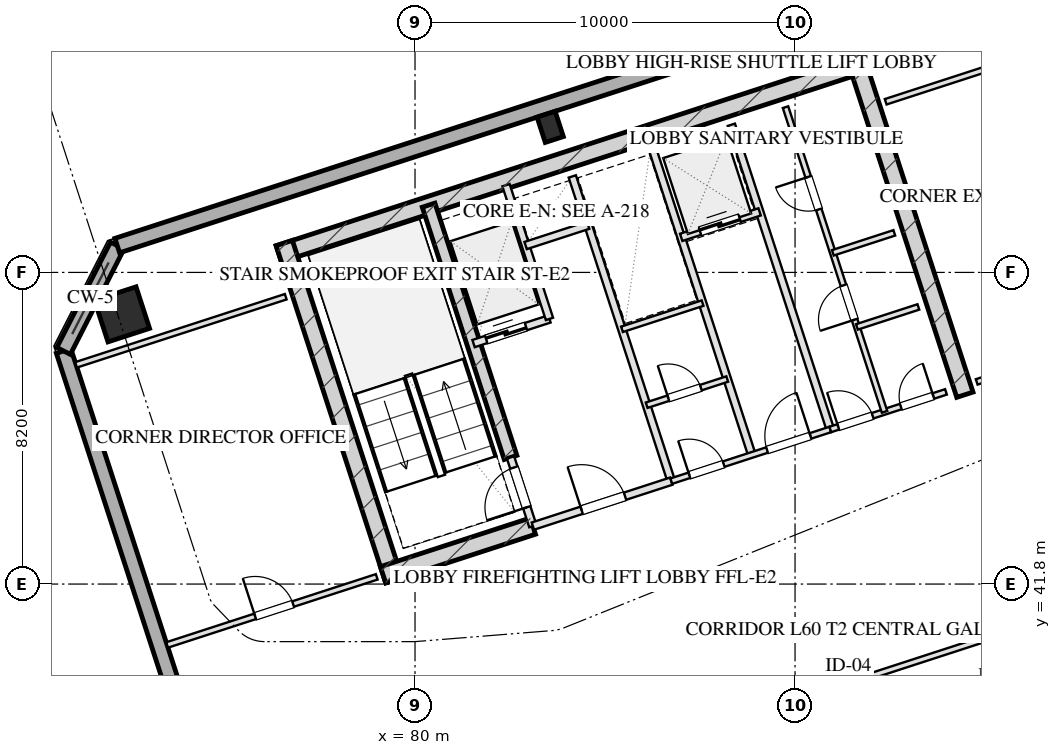
"""IFC4 building model, lengths in metres.
Left out: names, types, materials, properties, quantities, classifications, styles, units other than length and angle.
Written with IfcOpenShell. Run it as: python <this file> out.ifc"""

import sys

from ifc_helpers import new_model, si_unit, direction, frame, frame_2d, origin, origin_2d, place, context, subcontext, project, spatial, rectangle, hollow_rectangle, extrude, element, fill, save


model = new_model("IFC4")
c1 = context("Model", 3, precision=1e-05, world=origin(), true_north=direction((0.0, 1.0)))
c2 = subcontext(c1, "Body", "Model", "MODEL_VIEW")
j1 = project(units=[si_unit("LENGTHUNIT", "METRE"), si_unit("PLANEANGLEUNIT", "RADIAN")], contexts=[c1])
p1 = place(None, origin())
s1 = spatial("IfcSite", under=j1, at=p1, CompositionType="ELEMENT")
p2 = place(p1, origin())
s2 = spatial("IfcBuilding", under=s1, at=p2, CompositionType="ELEMENT")
p3 = place(p2, frame((0.0, 0.0, 223.1)))
s3 = spatial("IfcBuildingStorey", under=s2, at=p3, CompositionType="ELEMENT", Elevation=223.1)
p4 = place(p3, frame((76.415, 50.489, 0.0), z_axis=(0.0, 0.0, 1.0), x_axis=(0.951056810414, 0.309016089169, 0.0)))
e1 = element("IfcWall", 1, at=p4, inside=s3, PredefinedType="SHEAR", context=c2, shape_type="SweptSolid", body=[
    extrude(rectangle(XDim=16.25, YDim=0.45, at=frame_2d((8.125, 0.0))), origin(), (0.0, 0.0, 1.0), 3.45),
])
for number, where, z_axis, x_axis in (
    (2, (79.442, 41.899, 0.0), (0.0, 0.0, 1.0), (-0.309, 0.951, 0.0)),
    (3, (94.469, 46.781, 0.0), (0.0, 0.0, 1.0), (-0.309, 0.951, 0.0)),
):
    element("IfcWall", number, at=place(p3, frame(where, z_axis=z_axis, x_axis=x_axis)), inside=s3, PredefinedType="SHEAR", context=c2, shape_type="SweptSolid", body=[
        extrude(rectangle(XDim=9.33, YDim=0.45, at=frame_2d((4.665, 0.0))), origin(), (0.0, 0.0, 1.0), 3.45),
    ])
p5 = place(p3, frame((82.514, 45.131, 0.0), z_axis=(0.0, 0.0, 1.0), x_axis=(-0.308988790936, 0.951065679686, 0.0)))
e4 = element("IfcWall", 4, at=p5, inside=s3, PredefinedType="SHEAR", context=c2, shape_type="SweptSolid", body=[
    extrude(rectangle(XDim=6.98, YDim=0.35, at=frame_2d((3.49, 0.0))), origin(), (0.0, 0.0, 1.0), 3.45),
])
p6 = place(p3, frame((79.159, 42.043, 0.0), z_axis=(0.0, 0.0, 1.0), x_axis=(0.951047485828, 0.309044785913, 0.0)))
e5 = element("IfcWall", 5, at=p6, inside=s3, PredefinedType="SHEAR", context=c2, shape_type="SweptSolid", body=[
    extrude(rectangle(XDim=4.145, YDim=0.45, at=frame_2d((2.073, 0.0))), origin(), (0.0, 0.0, 1.0), 3.45),
])
for number, where, z_axis, x_axis in (
    (6, (95.572, 56.461, 0.0), (0.0, 0.0, 1.0), (0.951, 0.309, 0.0)),
    (7, (72.29, 48.896, 0.0), (0.0, 0.0, 1.0), (0.951, 0.309, 0.0)),
):
    element("IfcColumn", number, at=place(p3, frame(where, z_axis=z_axis, x_axis=x_axis)), inside=s3, PredefinedType="COLUMN", context=c2, shape_type="SweptSolid", body=[
        extrude(hollow_rectangle(XDim=1.15, YDim=1.15, WallThickness=0.04, at=origin_2d()), origin(), (0.0, 0.0, 1.0), 3.451),
    ])
p7 = place(p3, frame((83.557, 53.83, 0.0), z_axis=(0.0, 0.0, 1.0), x_axis=(0.951056516295, 0.309016994375, 0.0)))
e8 = element("IfcColumn", 8, at=p7, inside=s3, PredefinedType="COLUMN", context=c2, shape_type="SweptSolid", body=[
    extrude(hollow_rectangle(XDim=0.5, YDim=0.7, WallThickness=0.025, at=origin_2d()), origin(), (0.0, 0.0, 1.0), 3.451),
])
p8 = place(p3, frame((82.618, 11.414, 0.0), z_axis=(0.0, 0.0, 1.0), x_axis=(-0.309016491071, 0.951056679828, 0.0)))
e9 = element("IfcWall", 9, at=p8, inside=s3, PredefinedType="SOLIDWALL", context=c2, shape_type="SweptSolid", body=[
    extrude(rectangle(XDim=38.4, YDim=0.4, at=frame_2d((19.2, 0.0))), origin(), (0.0, 0.0, 1.0), 2.61),
])
p9 = place(p8, frame((11.75, 0.0, 0.75)))
e10 = element("IfcOpeningElement", 10, at=p9, cuts=e9, PredefinedType="OPENING", context=c2, shape_type="SweptSolid", body=[
    extrude(rectangle(XDim=2.1, YDim=1.46, at=frame_2d((1.05, 0.73))), frame((0.0, 0.21, 0.0), z_axis=(0.0, -1.0, 0.0), x_axis=(1.0, 0.0, 0.0)), (0.0, 0.0, 1.0), 0.42),
])
p10 = place(p8, frame((15.55, 0.0, 0.75)))
e11 = element("IfcOpeningElement", 11, at=p10, cuts=e9, PredefinedType="OPENING", context=c2, shape_type="SweptSolid", body=[
    extrude(rectangle(XDim=2.1, YDim=1.46, at=frame_2d((1.05, 0.73))), frame((0.0, 0.21, 0.0), z_axis=(0.0, -1.0, 0.0), x_axis=(1.0, 0.0, 0.0)), (0.0, 0.0, 1.0), 0.42),
])
p11 = place(p8, frame((20.75, 0.0, 0.75)))
e12 = element("IfcOpeningElement", 12, at=p11, cuts=e9, PredefinedType="OPENING", context=c2, shape_type="SweptSolid", body=[
    extrude(rectangle(XDim=2.1, YDim=1.46, at=frame_2d((1.05, 0.73))), frame((0.0, 0.21, 0.0), z_axis=(0.0, -1.0, 0.0), x_axis=(1.0, 0.0, 0.0)), (0.0, 0.0, 1.0), 0.42),
])
p12 = place(p8, frame((24.55, 0.0, 0.75)))
e13 = element("IfcOpeningElement", 13, at=p12, cuts=e9, PredefinedType="OPENING", context=c2, shape_type="SweptSolid", body=[
    extrude(rectangle(XDim=2.1, YDim=1.46, at=frame_2d((1.05, 0.73))), frame((0.0, 0.21, 0.0), z_axis=(0.0, -1.0, 0.0), x_axis=(1.0, 0.0, 0.0)), (0.0, 0.0, 1.0), 0.42),
])
p13 = place(p3, frame((70.752, 47.934, 0.0), z_axis=(0.0, 0.0, 1.0), x_axis=(0.453949291228, 0.891027519774, 0.0)))
e14 = element("IfcWall", 14, at=p13, inside=s3, PredefinedType="SOLIDWALL", context=c2, shape_type="SweptSolid", body=[
    extrude(rectangle(XDim=3.111, YDim=0.4, at=frame_2d((1.556, 0.0))), origin(), (0.0, 0.0, 1.0), 2.61),
])
p14 = place(p3, frame((72.165, 50.706, 0.0), z_axis=(0.0, 0.0, 1.0), x_axis=(0.951058012937, 0.309012388148, 0.0)))
e15 = element("IfcWall", 15, at=p14, inside=s3, PredefinedType="SOLIDWALL", context=c2, shape_type="SweptSolid", body=[
    extrude(rectangle(XDim=23.6, YDim=0.4, at=frame_2d((11.8, 0.0))), origin(), (0.0, 0.0, 1.0), 2.61),
])
p15 = place(p3, frame((83.101, 43.324, 0.0), z_axis=(0.0, 0.0, 1.0), x_axis=(-0.309048298632, 0.951046344356, 0.0)))
e16 = element("IfcWall", 16, at=p15, inside=s3, PredefinedType="PARTITIONING", context=c2, shape_type="SweptSolid", body=[
    extrude(rectangle(XDim=1.9, YDim=0.2, at=frame_2d((0.95, 0.0))), origin(), (0.0, 0.0, 1.0), 3.175),
])
p16 = place(p15, frame((0.52, 0.0, 0.0)))
e17 = element("IfcOpeningElement", 17, at=p16, cuts=e16, PredefinedType="OPENING", context=c2, shape_type="SweptSolid", body=[
    extrude(rectangle(XDim=1.1, YDim=2.05, at=frame_2d((0.55, 1.025))), frame((0.0, 0.11, 0.0), z_axis=(0.0, -1.0, 0.0), x_axis=(1.0, 0.0, 0.0)), (0.0, 0.0, 1.0), 0.22),
])
p17 = place(p3, frame((86.743, 44.508, 0.0), z_axis=(0.0, 0.0, 1.0), x_axis=(-0.309016001439, 0.951056838919, 0.0)))
e18 = element("IfcWall", 18, at=p17, inside=s3, PredefinedType="PARTITIONING", context=c2, shape_type="SweptSolid", body=[
    extrude(rectangle(XDim=8.43, YDim=0.2, at=frame_2d((4.215, 0.0))), origin(), (0.0, 0.0, 1.0), 3.175),
])
p18 = place(p3, frame((83.101, 43.324, 0.0), z_axis=(0.0, 0.0, 1.0), x_axis=(0.951052804469, 0.309028417967, 0.0)))
e19 = element("IfcWall", 19, at=p18, inside=s3, PredefinedType="PARTITIONING", context=c2, shape_type="SweptSolid", body=[
    extrude(rectangle(XDim=3.83, YDim=0.2, at=frame_2d((1.915, 0.0))), origin(), (0.0, 0.0, 1.0), 3.175),
])
p19 = place(p18, frame((1.35, 0.0, 0.0)))
e20 = element("IfcOpeningElement", 20, at=p19, cuts=e19, PredefinedType="OPENING", context=c2, shape_type="SweptSolid", body=[
    extrude(rectangle(XDim=1.2, YDim=2.05, at=frame_2d((0.6, 1.025))), frame((0.0, 0.11, 0.0), z_axis=(0.0, -1.0, 0.0), x_axis=(1.0, 0.0, 0.0)), (0.0, 0.0, 1.0), 0.22),
])
p20 = place(p3, frame((81.54, 48.127, 0.0), z_axis=(0.0, 0.0, 1.0), x_axis=(0.951062257173, 0.308999325213, 0.0)))
e21 = element("IfcWall", 21, at=p20, inside=s3, PredefinedType="PARTITIONING", context=c2, shape_type="SweptSolid", body=[
    extrude(rectangle(XDim=2.1, YDim=0.2, at=frame_2d((1.05, 0.0))), origin(), (0.0, 0.0, 1.0), 3.175),
])
p21 = place(p20, frame((0.35, 0.0, 0.0)))
e22 = element("IfcOpeningElement", 22, at=p21, cuts=e21, PredefinedType="OPENING", context=c2, shape_type="SweptSolid", body=[
    extrude(rectangle(XDim=1.1, YDim=2.05, at=frame_2d((0.55, 1.025))), frame((0.0, 0.11, 0.0), z_axis=(0.0, -1.0, 0.0), x_axis=(1.0, 0.0, 0.0)), (0.0, 0.0, 1.0), 0.22),
])
p22 = place(p3, frame((83.538, 48.776, 0.0), z_axis=(0.0, 0.0, 1.0), x_axis=(-0.3089935693, 0.951064127245, 0.0)))
e23 = element("IfcWall", 23, at=p22, inside=s3, PredefinedType="PARTITIONING", context=c2, shape_type="SweptSolid", body=[
    extrude(rectangle(XDim=3.7, YDim=0.2, at=frame_2d((1.85, 0.0))), origin(), (0.0, 0.0, 1.0), 3.175),
])
p23 = place(p3, frame((82.91, 50.707, 0.0), z_axis=(0.0, 0.0, 1.0), x_axis=(0.951041328149, 0.309063734775, 0.0)))
e24 = element("IfcWall", 24, at=p23, inside=s3, PredefinedType="PARTITIONING", context=c2, shape_type="SweptSolid", body=[
    extrude(rectangle(XDim=1.73, YDim=0.2, at=frame_2d((0.865, 0.0))), origin(), (0.0, 0.0, 1.0), 3.175),
])
p24 = place(p3, frame((90.928, 45.868, 0.0), z_axis=(0.0, 0.0, 1.0), x_axis=(-0.309042196757, 0.951048327176, 0.0)))
e25 = element("IfcWall", 25, at=p24, inside=s3, PredefinedType="PARTITIONING", context=c2, shape_type="SweptSolid", body=[
    extrude(rectangle(XDim=8.43, YDim=0.2, at=frame_2d((4.215, 0.0))), origin(), (0.0, 0.0, 1.0), 3.175),
])
p25 = place(p3, frame((88.864, 45.197, 0.0), z_axis=(0.0, 0.0, 1.0), x_axis=(-0.309007490203, 0.951059604335, 0.0)))
e26 = element("IfcWall", 26, at=p25, inside=s3, PredefinedType="PARTITIONING", context=c2, shape_type="SweptSolid", body=[
    extrude(rectangle(XDim=8.43, YDim=0.2, at=frame_2d((4.215, 0.0))), origin(), (0.0, 0.0, 1.0), 3.175),
])
p26 = place(p3, frame((86.743, 44.508, 0.0), z_axis=(0.0, 0.0, 1.0), x_axis=(0.951063829732, 0.308994485023, 0.0)))
e27 = element("IfcWall", 27, at=p26, inside=s3, PredefinedType="PARTITIONING", context=c2, shape_type="SweptSolid", body=[
    extrude(rectangle(XDim=4.4, YDim=0.15, at=frame_2d((2.2, 0.0))), origin(), (0.0, 0.0, 1.0), 3.175),
])
p27 = place(p26, frame((0.5, 0.0, 0.0)))
e28 = element("IfcOpeningElement", 28, at=p27, cuts=e27, PredefinedType="OPENING", context=c2, shape_type="SweptSolid", body=[
    extrude(rectangle(XDim=0.95, YDim=2.05, at=frame_2d((0.475, 1.025))), frame((0.0, 0.085, 0.0), z_axis=(0.0, -1.0, 0.0), x_axis=(1.0, 0.0, 0.0)), (0.0, 0.0, 1.0), 0.17),
])
p28 = place(p26, frame((2.65, 0.0, 0.0)))
e29 = element("IfcOpeningElement", 29, at=p28, cuts=e27, PredefinedType="OPENING", context=c2, shape_type="SweptSolid", body=[
    extrude(rectangle(XDim=1.2, YDim=2.05, at=frame_2d((0.6, 1.025))), frame((0.0, 0.085, 0.0), z_axis=(0.0, -1.0, 0.0), x_axis=(1.0, 0.0, 0.0)), (0.0, 0.0, 1.0), 0.17),
])
p29 = place(p3, frame((85.446, 48.502, 0.0), z_axis=(0.0, 0.0, 1.0), x_axis=(0.951075093106, 0.308959814982, 0.0)))
e30 = element("IfcWall", 30, at=p29, inside=s3, PredefinedType="PARTITIONING", context=c2, shape_type="SweptSolid", body=[
    extrude(rectangle(XDim=2.23, YDim=0.15, at=frame_2d((1.115, 0.0))), origin(), (0.0, 0.0, 1.0), 3.175),
])
p30 = place(p3, frame((86.094, 46.505, 0.0), z_axis=(0.0, 0.0, 1.0), x_axis=(0.951042918244, 0.309058841741, 0.0)))
e31 = element("IfcWall", 31, at=p30, inside=s3, PredefinedType="PARTITIONING", context=c2, shape_type="SweptSolid", body=[
    extrude(rectangle(XDim=2.23, YDim=0.15, at=frame_2d((1.115, 0.0))), origin(), (0.0, 0.0, 1.0), 3.175),
])
p31 = place(p30, frame((0.6, 0.0, 0.0)))
e32 = element("IfcOpeningElement", 32, at=p31, cuts=e31, PredefinedType="OPENING", context=c2, shape_type="SweptSolid", body=[
    extrude(rectangle(XDim=0.9, YDim=2.05, at=frame_2d((0.45, 1.025))), frame((0.0, 0.085, 0.0), z_axis=(0.0, -1.0, 0.0), x_axis=(1.0, 0.0, 0.0)), (0.0, 0.0, 1.0), 0.17),
])
p32 = place(p3, frame((87.004, 50.922, 0.0), z_axis=(0.0, 0.0, 1.0), x_axis=(0.951041509718, 0.309063176055, 0.0)))
e33 = element("IfcWall", 33, at=p32, inside=s3, PredefinedType="PARTITIONING", context=c2, shape_type="SweptSolid", body=[
    extrude(rectangle(XDim=2.17, YDim=0.2, at=frame_2d((1.085, 0.0))), origin(), (0.0, 0.0, 1.0), 3.175),
])
p33 = place(p32, frame((0.52, 0.0, 0.0)))
e34 = element("IfcOpeningElement", 34, at=p33, cuts=e33, PredefinedType="OPENING", context=c2, shape_type="SweptSolid", body=[
    extrude(rectangle(XDim=1.1, YDim=2.05, at=frame_2d((0.55, 1.025))), frame((0.0, 0.11, 0.0), z_axis=(0.0, -1.0, 0.0), x_axis=(1.0, 0.0, 0.0)), (0.0, 0.0, 1.0), 0.22),
])
p34 = place(p3, frame((90.928, 45.868, 0.0), z_axis=(0.0, 0.0, 1.0), x_axis=(0.951059297078, 0.309008435874, 0.0)))
e35 = element("IfcWall", 35, at=p34, inside=s3, PredefinedType="PARTITIONING", context=c2, shape_type="SweptSolid", body=[
    extrude(rectangle(XDim=3.2, YDim=0.15, at=frame_2d((1.6, 0.0))), origin(), (0.0, 0.0, 1.0), 3.175),
])
p35 = place(p34, frame((0.22, 0.0, 0.0)))
e36 = element("IfcOpeningElement", 36, at=p35, cuts=e35, PredefinedType="OPENING", context=c2, shape_type="SweptSolid", body=[
    extrude(rectangle(XDim=0.95, YDim=2.05, at=frame_2d((0.475, 1.025))), frame((0.0, 0.085, 0.0), z_axis=(0.0, -1.0, 0.0), x_axis=(1.0, 0.0, 0.0)), (0.0, 0.0, 1.0), 0.17),
])
p36 = place(p34, frame((1.95, 0.0, 0.0)))
e37 = element("IfcOpeningElement", 37, at=p36, cuts=e35, PredefinedType="OPENING", context=c2, shape_type="SweptSolid", body=[
    extrude(rectangle(XDim=0.9, YDim=2.05, at=frame_2d((0.45, 1.025))), frame((0.0, 0.085, 0.0), z_axis=(0.0, -1.0, 0.0), x_axis=(1.0, 0.0, 0.0)), (0.0, 0.0, 1.0), 0.17),
])
p37 = place(p3, frame((92.355, 46.331, 0.0), z_axis=(0.0, 0.0, 1.0), x_axis=(-0.309007490203, 0.951059604335, 0.0)))
e38 = element("IfcWall", 38, at=p37, inside=s3, PredefinedType="PARTITIONING", context=c2, shape_type="SweptSolid", body=[
    extrude(rectangle(XDim=8.43, YDim=0.15, at=frame_2d((4.215, 0.0))), origin(), (0.0, 0.0, 1.0), 3.175),
])
p38 = place(p37, frame((2.55, 0.0, 0.0)))
e39 = element("IfcOpeningElement", 39, at=p38, cuts=e38, PredefinedType="OPENING", context=c2, shape_type="SweptSolid", body=[
    extrude(rectangle(XDim=0.95, YDim=2.05, at=frame_2d((0.475, 1.025))), frame((0.0, 0.085, 0.0), z_axis=(0.0, -1.0, 0.0), x_axis=(1.0, 0.0, 0.0)), (0.0, 0.0, 1.0), 0.17),
])
p39 = place(p37, frame((5.6, 0.0, 0.0)))
e40 = element("IfcOpeningElement", 40, at=p39, cuts=e38, PredefinedType="OPENING", context=c2, shape_type="SweptSolid", body=[
    extrude(rectangle(XDim=0.9, YDim=2.05, at=frame_2d((0.45, 1.025))), frame((0.0, 0.085, 0.0), z_axis=(0.0, -1.0, 0.0), x_axis=(1.0, 0.0, 0.0)), (0.0, 0.0, 1.0), 0.17),
])
p40 = place(p3, frame((90.995, 50.516, 0.0), z_axis=(0.0, 0.0, 1.0), x_axis=(0.951040401051, 0.309066587596, 0.0)))
e41 = element("IfcWall", 41, at=p40, inside=s3, PredefinedType="PARTITIONING", context=c2, shape_type="SweptSolid", body=[
    extrude(rectangle(XDim=1.7, YDim=0.15, at=frame_2d((0.85, 0.0))), origin(), (0.0, 0.0, 1.0), 3.175),
])
p41 = place(p3, frame((91.628, 48.566, 0.0), z_axis=(0.0, 0.0, 1.0), x_axis=(0.951054116971, 0.309024378638, 0.0)))
e42 = element("IfcWall", 42, at=p41, inside=s3, PredefinedType="PARTITIONING", context=c2, shape_type="SweptSolid", body=[
    extrude(rectangle(XDim=1.7, YDim=0.15, at=frame_2d((0.85, 0.0))), origin(), (0.0, 0.0, 1.0), 3.175),
])
p42 = place(p3, frame((71.081, 47.568, 0.0), z_axis=(0.0, 0.0, 1.0), x_axis=(0.951059431056, 0.309008023519, 0.0)))
e43 = element("IfcWall", 43, at=p42, inside=s3, PredefinedType="PARTITIONING", context=c2, shape_type="SweptSolid", body=[
    extrude(rectangle(XDim=5.8, YDim=0.15, at=frame_2d((2.9, 0.0))), origin(), (0.0, 0.0, 1.0), 3.175),
])
p43 = place(p3, frame((73.476, 40.197, 0.0), z_axis=(0.0, 0.0, 1.0), x_axis=(0.951059431056, 0.309008023519, 0.0)))
e44 = element("IfcWall", 44, at=p43, inside=s3, PredefinedType="PARTITIONING", context=c2, shape_type="SweptSolid", body=[
    extrude(rectangle(XDim=5.8, YDim=0.15, at=frame_2d((2.9, 0.0))), origin(), (0.0, 0.0, 1.0), 3.175),
])
p44 = place(p43, frame((2.436, 0.0, 0.0)))
e45 = element("IfcOpeningElement", 45, at=p44, cuts=e44, PredefinedType="OPENING", context=c2, shape_type="SweptSolid", body=[
    extrude(rectangle(XDim=1.05, YDim=2.05, at=frame_2d((0.525, 1.025))), frame((0.0, 0.085, 0.0), z_axis=(0.0, -1.0, 0.0), x_axis=(1.0, 0.0, 0.0)), (0.0, 0.0, 1.0), 0.17),
])
p45 = place(p3, frame((92.385, 54.49, 0.0), z_axis=(0.0, 0.0, 1.0), x_axis=(0.951055112834, 0.309021313752, 0.0)))
e46 = element("IfcWall", 46, at=p45, inside=s3, PredefinedType="PARTITIONING", context=c2, shape_type="SweptSolid", body=[
    extrude(rectangle(XDim=5.2, YDim=0.15, at=frame_2d((2.6, 0.0))), origin(), (0.0, 0.0, 1.0), 3.175),
])
p46 = place(p3, frame((94.78, 47.119, 0.0), z_axis=(0.0, 0.0, 1.0), x_axis=(0.951055112834, 0.309021313752, 0.0)))
e47 = element("IfcWall", 47, at=p46, inside=s3, PredefinedType="PARTITIONING", context=c2, shape_type="SweptSolid", body=[
    extrude(rectangle(XDim=5.2, YDim=0.15, at=frame_2d((2.6, 0.0))), origin(), (0.0, 0.0, 1.0), 3.175),
])
p47 = place(p46, frame((2.184, 0.0, 0.0)))
e48 = element("IfcOpeningElement", 48, at=p47, cuts=e47, PredefinedType="OPENING", context=c2, shape_type="SweptSolid", body=[
    extrude(rectangle(XDim=0.85, YDim=2.05, at=frame_2d((0.425, 1.025))), frame((0.0, 0.085, 0.0), z_axis=(0.0, -1.0, 0.0), x_axis=(1.0, 0.0, 0.0)), (0.0, 0.0, 1.0), 0.17),
])
for number, where, z_axis, x_axis in (
    (49, (91.962, 39.369, 0.0), (0.0, 0.0, 1.0), (0.951, 0.309, 0.0)),
    (50, (92.991, 36.202, 0.0), (0.0, 0.0, 1.0), (0.951, 0.309, 0.0)),
):
    element("IfcWall", number, at=place(p3, frame(where, z_axis=z_axis, x_axis=x_axis)), inside=s3, PredefinedType="PARTITIONING", context=c2, shape_type="SweptSolid", body=[
        extrude(rectangle(XDim=10.275, YDim=0.15, at=frame_2d((5.137, 0.0))), origin(), (0.0, 0.0, 1.0), 3.175),
    ])
p48 = place(p16, origin())
e51 = element("IfcDoor", 51, at=p48, inside=s3, OperationType="SINGLE_SWING_LEFT", PredefinedType="DOOR", context=c2, shape_type="SweptSolid", body=[
    extrude(rectangle(XDim=1.1, YDim=2.05, at=frame_2d((0.55, 1.025))), frame((0.0, 0.025, 0.0), z_axis=(0.0, -1.0, 0.0), x_axis=(1.0, 0.0, 0.0)), (0.0, 0.0, 1.0), 0.05),
])
fill(e17, e51)
p49 = place(p19, origin())
e52 = element("IfcDoor", 52, at=p49, inside=s3, OperationType="SINGLE_SWING_LEFT", PredefinedType="DOOR", context=c2, shape_type="SweptSolid", body=[
    extrude(rectangle(XDim=1.2, YDim=2.05, at=frame_2d((0.6, 1.025))), frame((0.0, 0.025, 0.0), z_axis=(0.0, -1.0, 0.0), x_axis=(1.0, 0.0, 0.0)), (0.0, 0.0, 1.0), 0.05),
])
fill(e20, e52)
p50 = place(p21, origin())
e53 = element("IfcDoor", 53, at=p50, inside=s3, OperationType="DOUBLE_DOOR_SLIDING", PredefinedType="DOOR", context=c2, shape_type="SweptSolid", body=[
    extrude(rectangle(XDim=1.1, YDim=2.05, at=frame_2d((0.55, 1.025))), frame((0.0, 0.025, 0.0), z_axis=(0.0, -1.0, 0.0), x_axis=(1.0, 0.0, 0.0)), (0.0, 0.0, 1.0), 0.05),
])
fill(e22, e53)
p51 = place(p27, origin())
e54 = element("IfcDoor", 54, at=p51, inside=s3, OperationType="SINGLE_SWING_LEFT", PredefinedType="DOOR", context=c2, shape_type="SweptSolid", body=[
    extrude(rectangle(XDim=0.95, YDim=2.05, at=frame_2d((0.475, 1.025))), frame((0.0, 0.025, 0.0), z_axis=(0.0, -1.0, 0.0), x_axis=(1.0, 0.0, 0.0)), (0.0, 0.0, 1.0), 0.05),
])
fill(e28, e54)
p52 = place(p28, origin())
e55 = element("IfcDoor", 55, at=p52, inside=s3, OperationType="SINGLE_SWING_RIGHT", PredefinedType="DOOR", context=c2, shape_type="SweptSolid", body=[
    extrude(rectangle(XDim=1.2, YDim=2.05, at=frame_2d((0.6, 1.025))), frame((0.0, 0.025, 0.0), z_axis=(0.0, -1.0, 0.0), x_axis=(1.0, 0.0, 0.0)), (0.0, 0.0, 1.0), 0.05),
])
fill(e29, e55)
p53 = place(p31, origin())
e56 = element("IfcDoor", 56, at=p53, inside=s3, OperationType="SINGLE_SWING_LEFT", PredefinedType="DOOR", context=c2, shape_type="SweptSolid", body=[
    extrude(rectangle(XDim=0.9, YDim=2.05, at=frame_2d((0.45, 1.025))), frame((0.0, 0.025, 0.0), z_axis=(0.0, -1.0, 0.0), x_axis=(1.0, 0.0, 0.0)), (0.0, 0.0, 1.0), 0.05),
])
fill(e32, e56)
p54 = place(p33, origin())
e57 = element("IfcDoor", 57, at=p54, inside=s3, OperationType="DOUBLE_DOOR_SLIDING", PredefinedType="DOOR", context=c2, shape_type="SweptSolid", body=[
    extrude(rectangle(XDim=1.1, YDim=2.05, at=frame_2d((0.55, 1.025))), frame((0.0, 0.025, 0.0), z_axis=(0.0, -1.0, 0.0), x_axis=(1.0, 0.0, 0.0)), (0.0, 0.0, 1.0), 0.05),
])
fill(e34, e57)
p55 = place(p35, origin())
e58 = element("IfcDoor", 58, at=p55, inside=s3, OperationType="SINGLE_SWING_LEFT", PredefinedType="DOOR", context=c2, shape_type="SweptSolid", body=[
    extrude(rectangle(XDim=0.95, YDim=2.05, at=frame_2d((0.475, 1.025))), frame((0.0, 0.025, 0.0), z_axis=(0.0, -1.0, 0.0), x_axis=(1.0, 0.0, 0.0)), (0.0, 0.0, 1.0), 0.05),
])
fill(e36, e58)
p56 = place(p36, origin())
e59 = element("IfcDoor", 59, at=p56, inside=s3, OperationType="SINGLE_SWING_RIGHT", PredefinedType="DOOR", context=c2, shape_type="SweptSolid", body=[
    extrude(rectangle(XDim=0.9, YDim=2.05, at=frame_2d((0.45, 1.025))), frame((0.0, 0.025, 0.0), z_axis=(0.0, -1.0, 0.0), x_axis=(1.0, 0.0, 0.0)), (0.0, 0.0, 1.0), 0.05),
])
fill(e37, e59)
p57 = place(p38, origin())
e60 = element("IfcDoor", 60, at=p57, inside=s3, OperationType="SINGLE_SWING_LEFT", PredefinedType="DOOR", context=c2, shape_type="SweptSolid", body=[
    extrude(rectangle(XDim=0.95, YDim=2.05, at=frame_2d((0.475, 1.025))), frame((0.0, 0.025, 0.0), z_axis=(0.0, -1.0, 0.0), x_axis=(1.0, 0.0, 0.0)), (0.0, 0.0, 1.0), 0.05),
])
fill(e39, e60)
p58 = place(p39, origin())
e61 = element("IfcDoor", 61, at=p58, inside=s3, OperationType="SINGLE_SWING_RIGHT", PredefinedType="DOOR", context=c2, shape_type="SweptSolid", body=[
    extrude(rectangle(XDim=0.9, YDim=2.05, at=frame_2d((0.45, 1.025))), frame((0.0, 0.025, 0.0), z_axis=(0.0, -1.0, 0.0), x_axis=(1.0, 0.0, 0.0)), (0.0, 0.0, 1.0), 0.05),
])
fill(e40, e61)
p59 = place(p44, origin())
e62 = element("IfcDoor", 62, at=p59, inside=s3, OperationType="SINGLE_SWING_LEFT", PredefinedType="DOOR", context=c2, shape_type="SweptSolid", body=[
    extrude(rectangle(XDim=1.05, YDim=2.05, at=frame_2d((0.525, 1.025))), frame((0.0, 0.025, 0.0), z_axis=(0.0, -1.0, 0.0), x_axis=(1.0, 0.0, 0.0)), (0.0, 0.0, 1.0), 0.05),
])
fill(e45, e62)
save(model, sys.argv[1])
